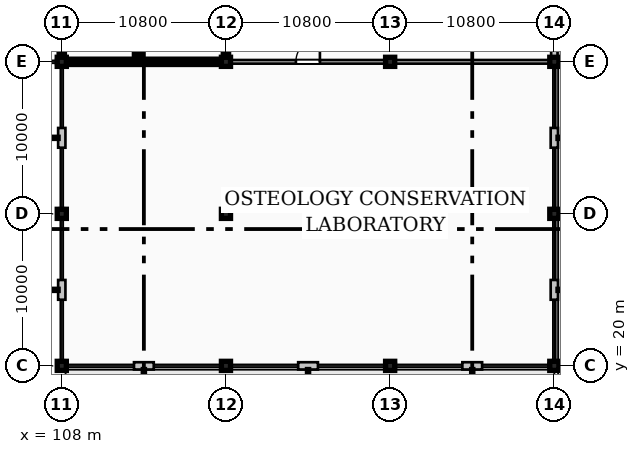
"""IFC4 building model, lengths in metres.
Left out: names, types, materials, properties, quantities, classifications, styles, units other than length and angle.
Written with IfcOpenShell. Run it as: python <this file> out.ifc"""

import sys

from ifc_helpers import new_model, si_unit, direction, frame, frame_2d, origin, origin_2d, place, context, subcontext, project, spatial, rectangle, extrude, element, fill, save


model = new_model("IFC4")
c1 = context("Model", 3, precision=1e-05, world=origin(), true_north=direction((0.0, 1.0)))
c2 = subcontext(c1, "Body", "Model", "MODEL_VIEW")
j1 = project(units=[si_unit("LENGTHUNIT", "METRE"), si_unit("PLANEANGLEUNIT", "RADIAN")], contexts=[c1])
p1 = place(None, origin())
s1 = spatial("IfcSite", under=j1, at=p1, CompositionType="ELEMENT")
p2 = place(p1, origin())
s2 = spatial("IfcBuilding", under=s1, at=p2, CompositionType="ELEMENT")
p3 = place(p2, frame((0.0, 0.0, 9.6)))
s3 = spatial("IfcBuildingStorey", under=s2, at=p3, CompositionType="ELEMENT", Elevation=9.6)
for number, where, z_axis, x_axis in (
    (1, (108.0, 20.0, 0.0), (0.0, 0.0, 1.0), (1.0, 0.0, 0.0)),
    (2, (108.0, 30.0, 0.0), (0.0, 0.0, 1.0), (1.0, 0.0, 0.0)),
    (3, (108.0, 40.0, 0.0), (0.0, 0.0, 1.0), (1.0, 0.0, 0.0)),
    (4, (118.8, 20.0, 0.0), (0.0, 0.0, 1.0), (1.0, 0.0, 0.0)),
    (5, (118.8, 30.0, 0.0), (0.0, 0.0, 1.0), (1.0, 0.0, 0.0)),
    (6, (118.8, 40.0, 0.0), (0.0, 0.0, 1.0), (1.0, 0.0, 0.0)),
    (7, (129.6, 20.0, 0.0), (0.0, 0.0, 1.0), (1.0, 0.0, 0.0)),
    (8, (129.6, 30.0, 0.0), (0.0, 0.0, 1.0), (1.0, 0.0, 0.0)),
    (9, (129.6, 40.0, 0.0), (0.0, 0.0, 1.0), (1.0, 0.0, 0.0)),
    (10, (140.4, 20.0, 0.0), (0.0, 0.0, 1.0), (1.0, 0.0, 0.0)),
    (11, (140.4, 30.0, 0.0), (0.0, 0.0, 1.0), (1.0, 0.0, 0.0)),
    (12, (140.4, 40.0, 0.0), (0.0, 0.0, 1.0), (1.0, 0.0, 0.0)),
):
    element("IfcColumn", number, at=place(p3, frame(where, z_axis=z_axis, x_axis=x_axis)), inside=s3, PredefinedType="COLUMN", context=c2, shape_type="SweptSolid", body=[
        extrude(rectangle(XDim=0.6, YDim=0.6, at=origin_2d()), origin(), (0.0, 0.0, 1.0), 4.8),
    ])
p4 = place(p3, frame((108.0, 35.65, 0.0), z_axis=(0.0, 0.0, 1.0), x_axis=(0.0, -1.0, 0.0)))
e13 = element("IfcWall", 13, at=p4, inside=s3, PredefinedType="STANDARD", context=c2, shape_type="SweptSolid", body=[
    extrude(rectangle(XDim=1.3, YDim=0.48, at=frame_2d((0.65, 0.0))), origin(), (0.0, 0.0, 1.0), 4.56),
])
for number, where, z_axis, x_axis in (
    (14, (108.0, 39.855, 0.0), (0.0, 0.0, 1.0), (0.0, -1.0, 0.0)),
    (15, (108.0, 30.37, 0.0), (0.0, 0.0, 1.0), (0.0, -1.0, 0.0)),
):
    element("IfcWall", number, at=place(p3, frame(where, z_axis=z_axis, x_axis=x_axis)), inside=s3, PredefinedType="STANDARD", context=c2, shape_type="SweptSolid", body=[
        extrude(rectangle(XDim=0.225, YDim=0.3, at=frame_2d((0.113, 0.0))), origin(), (0.0, 0.0, 1.0), 4.56),
    ])
p5 = place(p3, frame((108.0, 25.65, 0.0), z_axis=(0.0, 0.0, 1.0), x_axis=(0.0, -1.0, 0.0)))
e16 = element("IfcWall", 16, at=p5, inside=s3, PredefinedType="STANDARD", context=c2, shape_type="SweptSolid", body=[
    extrude(rectangle(XDim=1.3, YDim=0.48, at=frame_2d((0.65, 0.0))), origin(), (0.0, 0.0, 1.0), 4.13),
])
for number, where, z_axis, x_axis in (
    (17, (108.0, 29.855, 0.0), (0.0, 0.0, 1.0), (0.0, -1.0, 0.0)),
    (18, (108.0, 20.37, 0.0), (0.0, 0.0, 1.0), (0.0, -1.0, 0.0)),
):
    element("IfcWall", number, at=place(p3, frame(where, z_axis=z_axis, x_axis=x_axis)), inside=s3, PredefinedType="STANDARD", context=c2, shape_type="SweptSolid", body=[
        extrude(rectangle(XDim=0.225, YDim=0.3, at=frame_2d((0.113, 0.0))), origin(), (0.0, 0.0, 1.0), 4.56),
    ])
p6 = place(p3, frame((112.75, 20.0, 0.0), z_axis=(0.0, 0.0, 1.0), x_axis=(1.0, 0.0, 0.0)))
e19 = element("IfcWall", 19, at=p6, inside=s3, PredefinedType="STANDARD", context=c2, shape_type="SweptSolid", body=[
    extrude(rectangle(XDim=1.3, YDim=0.48, at=frame_2d((0.65, 0.0))), origin(), (0.0, 0.0, 1.0), 4.13),
])
for number, where, z_axis, x_axis in (
    (20, (108.145, 20.0, 0.0), (0.0, 0.0, 1.0), (1.0, 0.0, 0.0)),
    (21, (118.43, 20.0, 0.0), (0.0, 0.0, 1.0), (1.0, 0.0, 0.0)),
):
    element("IfcWall", number, at=place(p3, frame(where, z_axis=z_axis, x_axis=x_axis)), inside=s3, PredefinedType="STANDARD", context=c2, shape_type="SweptSolid", body=[
        extrude(rectangle(XDim=0.225, YDim=0.3, at=frame_2d((0.113, 0.0))), origin(), (0.0, 0.0, 1.0), 4.56),
    ])
p7 = place(p3, frame((123.55, 20.0, 0.0), z_axis=(0.0, 0.0, 1.0), x_axis=(1.0, 0.0, 0.0)))
e22 = element("IfcWall", 22, at=p7, inside=s3, PredefinedType="STANDARD", context=c2, shape_type="SweptSolid", body=[
    extrude(rectangle(XDim=1.3, YDim=0.48, at=frame_2d((0.65, 0.0))), origin(), (0.0, 0.0, 1.0), 4.13),
])
p8 = place(p3, frame((118.945, 20.0, 0.0), z_axis=(0.0, 0.0, 1.0), x_axis=(1.0, 0.0, 0.0)))
e23 = element("IfcWall", 23, at=p8, inside=s3, PredefinedType="STANDARD", context=c2, shape_type="SweptSolid", body=[
    extrude(rectangle(XDim=0.225, YDim=0.3, at=frame_2d((0.112, 0.0))), origin(), (0.0, 0.0, 1.0), 4.56),
])
p9 = place(p3, frame((129.23, 20.0, 0.0), z_axis=(0.0, 0.0, 1.0), x_axis=(1.0, 0.0, 0.0)))
e24 = element("IfcWall", 24, at=p9, inside=s3, PredefinedType="STANDARD", context=c2, shape_type="SweptSolid", body=[
    extrude(rectangle(XDim=0.225, YDim=0.3, at=frame_2d((0.113, 0.0))), origin(), (0.0, 0.0, 1.0), 4.56),
])
p10 = place(p3, frame((134.35, 20.0, 0.0), z_axis=(0.0, 0.0, 1.0), x_axis=(1.0, 0.0, 0.0)))
e25 = element("IfcWall", 25, at=p10, inside=s3, PredefinedType="STANDARD", context=c2, shape_type="SweptSolid", body=[
    extrude(rectangle(XDim=1.3, YDim=0.48, at=frame_2d((0.65, 0.0))), origin(), (0.0, 0.0, 1.0), 4.13),
])
for number, where, z_axis, x_axis in (
    (26, (129.745, 20.0, 0.0), (0.0, 0.0, 1.0), (1.0, 0.0, 0.0)),
    (27, (140.03, 20.0, 0.0), (0.0, 0.0, 1.0), (1.0, 0.0, 0.0)),
):
    element("IfcWall", number, at=place(p3, frame(where, z_axis=z_axis, x_axis=x_axis)), inside=s3, PredefinedType="STANDARD", context=c2, shape_type="SweptSolid", body=[
        extrude(rectangle(XDim=0.225, YDim=0.3, at=frame_2d((0.112, 0.0))), origin(), (0.0, 0.0, 1.0), 4.56),
    ])
p11 = place(p3, frame((140.4, 24.35, 0.0), z_axis=(0.0, 0.0, 1.0), x_axis=(0.0, 1.0, 0.0)))
e28 = element("IfcWall", 28, at=p11, inside=s3, PredefinedType="STANDARD", context=c2, shape_type="SweptSolid", body=[
    extrude(rectangle(XDim=1.3, YDim=0.48, at=frame_2d((0.65, 0.0))), origin(), (0.0, 0.0, 1.0), 4.13),
])
for number, where, z_axis, x_axis in (
    (29, (140.4, 20.145, 0.0), (0.0, 0.0, 1.0), (0.0, 1.0, 0.0)),
    (30, (140.4, 29.63, 0.0), (0.0, 0.0, 1.0), (0.0, 1.0, 0.0)),
):
    element("IfcWall", number, at=place(p3, frame(where, z_axis=z_axis, x_axis=x_axis)), inside=s3, PredefinedType="STANDARD", context=c2, shape_type="SweptSolid", body=[
        extrude(rectangle(XDim=0.225, YDim=0.3, at=frame_2d((0.113, 0.0))), origin(), (0.0, 0.0, 1.0), 4.56),
    ])
p12 = place(p3, frame((140.4, 34.35, 0.0), z_axis=(0.0, 0.0, 1.0), x_axis=(0.0, 1.0, 0.0)))
e31 = element("IfcWall", 31, at=p12, inside=s3, PredefinedType="STANDARD", context=c2, shape_type="SweptSolid", body=[
    extrude(rectangle(XDim=1.3, YDim=0.48, at=frame_2d((0.65, 0.0))), origin(), (0.0, 0.0, 1.0), 4.13),
])
for number, where, z_axis, x_axis in (
    (32, (140.4, 30.145, 0.0), (0.0, 0.0, 1.0), (0.0, 1.0, 0.0)),
    (33, (140.4, 39.63, 0.0), (0.0, 0.0, 1.0), (0.0, 1.0, 0.0)),
):
    element("IfcWall", number, at=place(p3, frame(where, z_axis=z_axis, x_axis=x_axis)), inside=s3, PredefinedType="STANDARD", context=c2, shape_type="SweptSolid", body=[
        extrude(rectangle(XDim=0.225, YDim=0.3, at=frame_2d((0.113, 0.0))), origin(), (0.0, 0.0, 1.0), 4.56),
    ])
p13 = place(p3, frame((140.4, 40.145, 0.0), z_axis=(0.0, 0.0, 1.0), x_axis=(0.0, 1.0, 0.0)))
e34 = element("IfcWall", 34, at=p13, inside=s3, PredefinedType="STANDARD", context=c2, shape_type="SweptSolid", body=[
    extrude(rectangle(XDim=9.71, YDim=0.42, at=frame_2d((4.855, 0.0))), origin(), (0.0, 0.0, 1.0), 4.13),
])
p14 = place(p13, frame((4.055, 0.0, 1.2)))
e35 = element("IfcOpeningElement", 35, at=p14, cuts=e34, PredefinedType="OPENING", context=c2, shape_type="SweptSolid", body=[
    extrude(rectangle(XDim=1.6, YDim=1.8, at=frame_2d((0.8, 0.9))), frame((0.0, 0.22, 0.0), z_axis=(0.0, -1.0, 0.0), x_axis=(1.0, 0.0, 0.0)), (0.0, 0.0, 1.0), 0.44),
])
p15 = place(p3, frame((107.63, 40.0, 0.0), z_axis=(0.0, 0.0, 1.0), x_axis=(1.0, 0.0, 0.0)))
e36 = element("IfcWall", 36, at=p15, inside=s3, PredefinedType="STANDARD", context=c2, shape_type="SweptSolid", body=[
    extrude(rectangle(XDim=0.225, YDim=0.3, at=frame_2d((0.113, 0.0))), origin(), (0.0, 0.0, 1.0), 4.56),
])
p16 = place(p3, frame((108.3, 40.0, 0.0), z_axis=(0.0, 0.0, 1.0), x_axis=(1.0, 0.0, 0.0)))
e37 = element("IfcWall", 37, at=p16, inside=s3, PredefinedType="SHEAR", context=c2, shape_type="SweptSolid", body=[
    extrude(rectangle(XDim=10.2, YDim=0.35, at=frame_2d((5.1, 0.0))), origin(), (0.0, 0.0, 1.0), 4.56),
])
p17 = place(p3, frame((108.0, 40.3, 0.0), z_axis=(0.0, 0.0, 1.0), x_axis=(0.0, 1.0, 0.0)))
e38 = element("IfcWall", 38, at=p17, inside=s3, PredefinedType="SHEAR", context=c2, shape_type="SweptSolid", body=[
    extrude(rectangle(XDim=9.4, YDim=0.35, at=frame_2d((4.7, 0.0))), origin(), (0.0, 0.0, 1.0), 4.56),
])
p18 = place(p3, frame((118.8, 40.3, 0.0), z_axis=(0.0, 0.0, 1.0), x_axis=(0.0, 1.0, 0.0)))
e39 = element("IfcWall", 39, at=p18, inside=s3, PredefinedType="SHEAR", context=c2, shape_type="SweptSolid", body=[
    extrude(rectangle(XDim=9.4, YDim=0.35, at=frame_2d((4.7, 0.0))), origin(), (0.0, 0.0, 1.0), 4.56),
])
p19 = place(p18, frame((0.88, 0.0, 0.0)))
e40 = element("IfcOpeningElement", 40, at=p19, cuts=e39, PredefinedType="OPENING", context=c2, shape_type="SweptSolid", body=[
    extrude(rectangle(XDim=1.8, YDim=2.25, at=frame_2d((0.9, 1.125))), frame((0.0, 0.185, 0.0), z_axis=(0.0, -1.0, 0.0), x_axis=(1.0, 0.0, 0.0)), (0.0, 0.0, 1.0), 0.37),
])
p20 = place(p3, frame((112.95, 40.175, 0.0), z_axis=(0.0, 0.0, 1.0), x_axis=(0.0, 1.0, 0.0)))
e41 = element("IfcWall", 41, at=p20, inside=s3, PredefinedType="SHEAR", context=c2, shape_type="SweptSolid", body=[
    extrude(rectangle(XDim=9.65, YDim=0.35, at=frame_2d((4.825, 0.0))), origin(), (0.0, 0.0, 1.0), 4.56),
])
p21 = place(p20, frame((0.9, 0.0, 0.0)))
e42 = element("IfcOpeningElement", 42, at=p21, cuts=e41, PredefinedType="OPENING", context=c2, shape_type="SweptSolid", body=[
    extrude(rectangle(XDim=1.1, YDim=2.2, at=frame_2d((0.55, 1.1))), frame((0.0, 0.185, 0.0), z_axis=(0.0, -1.0, 0.0), x_axis=(1.0, 0.0, 0.0)), (0.0, 0.0, 1.0), 0.37),
])
p22 = place(p3, frame((118.98, 40.0, 0.0), z_axis=(0.0, 0.0, 1.0), x_axis=(1.0, 0.0, 0.0)))
e43 = element("IfcWall", 43, at=p22, inside=s3, PredefinedType="SOLIDWALL", context=c2, shape_type="SweptSolid", body=[
    extrude(rectangle(XDim=10.42, YDim=0.24, at=frame_2d((5.21, 0.0))), origin(), (0.0, 0.0, 1.0), 3.929),
])
p23 = place(p22, frame((4.42, 0.0, 0.0)))
e44 = element("IfcOpeningElement", 44, at=p23, cuts=e43, PredefinedType="OPENING", context=c2, shape_type="SweptSolid", body=[
    extrude(rectangle(XDim=1.58, YDim=2.48, at=frame_2d((0.79, 1.24))), frame((0.0, 0.13, 0.0), z_axis=(0.0, -1.0, 0.0), x_axis=(1.0, 0.0, 0.0)), (0.0, 0.0, 1.0), 0.26),
])
p24 = place(p3, frame((129.8, 40.0, 0.0), z_axis=(0.0, 0.0, 1.0), x_axis=(1.0, 0.0, 0.0)))
e45 = element("IfcWall", 45, at=p24, inside=s3, PredefinedType="SOLIDWALL", context=c2, shape_type="SweptSolid", body=[
    extrude(rectangle(XDim=10.42, YDim=0.24, at=frame_2d((5.21, 0.0))), origin(), (0.0, 0.0, 1.0), 4.13),
])
p25 = place(p23, origin())
e46 = element("IfcDoor", 46, at=p25, inside=s3, OperationType="SINGLE_SWING_RIGHT", PredefinedType="DOOR", context=c2, shape_type="SweptSolid", body=[
    extrude(rectangle(XDim=1.58, YDim=2.48, at=frame_2d((0.79, 1.24))), frame((0.0, 0.025, 0.0), z_axis=(0.0, -1.0, 0.0), x_axis=(1.0, 0.0, 0.0)), (0.0, 0.0, 1.0), 0.05),
])
fill(e44, e46)
save(model, sys.argv[1])
